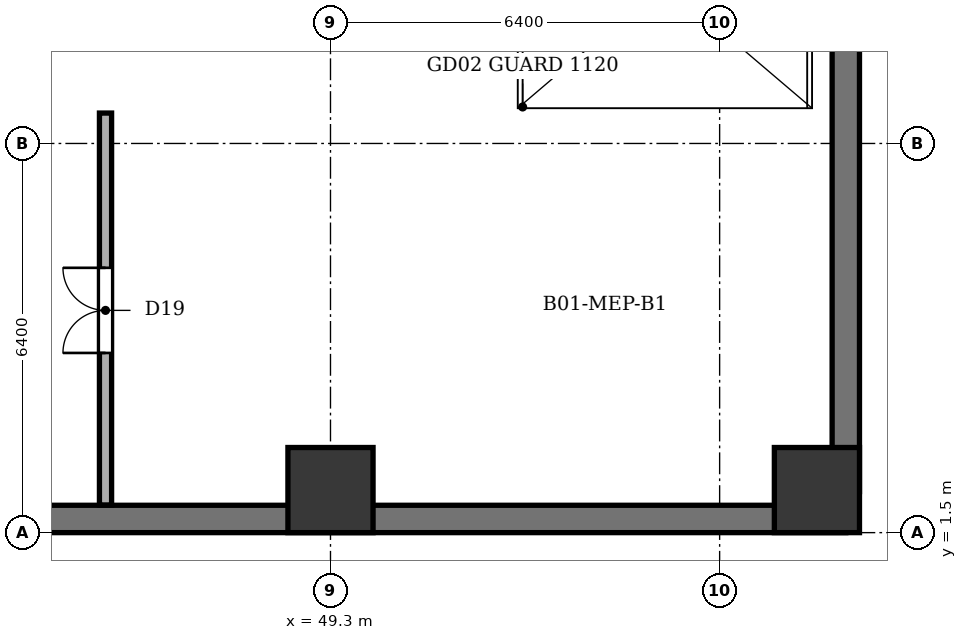
"""IFC4 building model, lengths in metres.
Left out: names, types, materials, properties, quantities, classifications, styles, units other than length and angle.
Written with IfcOpenShell. Run it as: python <this file> out.ifc"""

import sys

from ifc_helpers import new_model, si_unit, direction, frame, frame_2d, origin, origin_2d, place, context, subcontext, project, spatial, rectangle, extrude, element, fill, save


model = new_model("IFC4")
c1 = context("Model", 3, precision=1e-05, world=origin(), true_north=direction((0.0, 1.0)))
c2 = subcontext(c1, "Body", "Model", "MODEL_VIEW")
j1 = project(units=[si_unit("LENGTHUNIT", "METRE"), si_unit("PLANEANGLEUNIT", "RADIAN")], contexts=[c1])
p1 = place(None, origin())
s1 = spatial("IfcSite", under=j1, at=p1, CompositionType="ELEMENT")
p2 = place(p1, origin())
s2 = spatial("IfcBuilding", under=s1, at=p2, CompositionType="ELEMENT")
p3 = place(p2, frame((0.0, 0.0, -4.8)))
s3 = spatial("IfcBuildingStorey", under=s2, at=p3, CompositionType="ELEMENT", Elevation=-4.8)
p4 = place(p3, frame((2.625, 1.725, 0.0), z_axis=(0.0, 0.0, 1.0), x_axis=(1.0, 0.0, 0.0)))
e1 = element("IfcWall", 1, at=p4, inside=s3, PredefinedType="SOLIDWALL", context=c2, shape_type="SweptSolid", body=[
    extrude(rectangle(XDim=55.15, YDim=0.45, at=frame_2d((27.575, 0.0))), origin(), (0.0, 0.0, 1.0), 4.55),
])
p5 = place(p3, frame((57.775, 2.175, 0.0), z_axis=(0.0, 0.0, 1.0), x_axis=(0.0, 1.0, 0.0)))
e2 = element("IfcWall", 2, at=p5, inside=s3, PredefinedType="SOLIDWALL", context=c2, shape_type="SweptSolid", body=[
    extrude(rectangle(XDim=50.05, YDim=0.45, at=frame_2d((25.025, 0.0))), origin(), (0.0, 0.0, 1.0), 4.55),
])
for number, where, z_axis, x_axis in (
    (3, (49.3, 2.2, 0.0), (0.0, 0.0, 1.0), (1.0, 0.0, 0.0)),
    (4, (57.3, 2.2, 0.0), (0.0, 0.0, 1.0), (1.0, 0.0, 0.0)),
):
    element("IfcColumn", number, at=place(p3, frame(where, z_axis=z_axis, x_axis=x_axis)), inside=s3, PredefinedType="COLUMN", context=c2, shape_type="SweptSolid", body=[
        extrude(rectangle(XDim=1.4, YDim=1.4, at=origin_2d()), origin(), (0.0, 0.0, 1.0), 4.8),
    ])
p6 = place(p3, frame((45.6, 1.955, 0.0), z_axis=(0.0, 0.0, 1.0), x_axis=(0.0, 1.0, 0.0)))
e5 = element("IfcWall", 5, at=p6, inside=s3, PredefinedType="SOLIDWALL", context=c2, shape_type="SweptSolid", body=[
    extrude(rectangle(XDim=6.445, YDim=0.2, at=frame_2d((3.222, 0.0))), origin(), (0.0, 0.0, 1.0), 4.35),
])
p7 = place(p6, frame((2.5, 0.0, 0.0)))
e6 = element("IfcOpeningElement", 6, at=p7, cuts=e5, PredefinedType="OPENING", context=c2, shape_type="SweptSolid", body=[
    extrude(rectangle(XDim=1.4, YDim=2.15, at=frame_2d((0.7, 1.075))), frame((0.0, 0.11, 0.0), z_axis=(0.0, -1.0, 0.0), x_axis=(1.0, 0.0, 0.0)), (0.0, 0.0, 1.0), 0.22),
])
p8 = place(p7, origin())
e7 = element("IfcDoor", 7, at=p8, inside=s3, OperationType="DOUBLE_DOOR_SINGLE_SWING", PredefinedType="DOOR", context=c2, shape_type="SweptSolid", body=[
    extrude(rectangle(XDim=1.4, YDim=2.15, at=frame_2d((0.7, 1.075))), frame((0.0, 0.025, 0.0), z_axis=(0.0, -1.0, 0.0), x_axis=(1.0, 0.0, 0.0)), (0.0, 0.0, 1.0), 0.05),
])
fill(e6, e7)
save(model, sys.argv[1])
